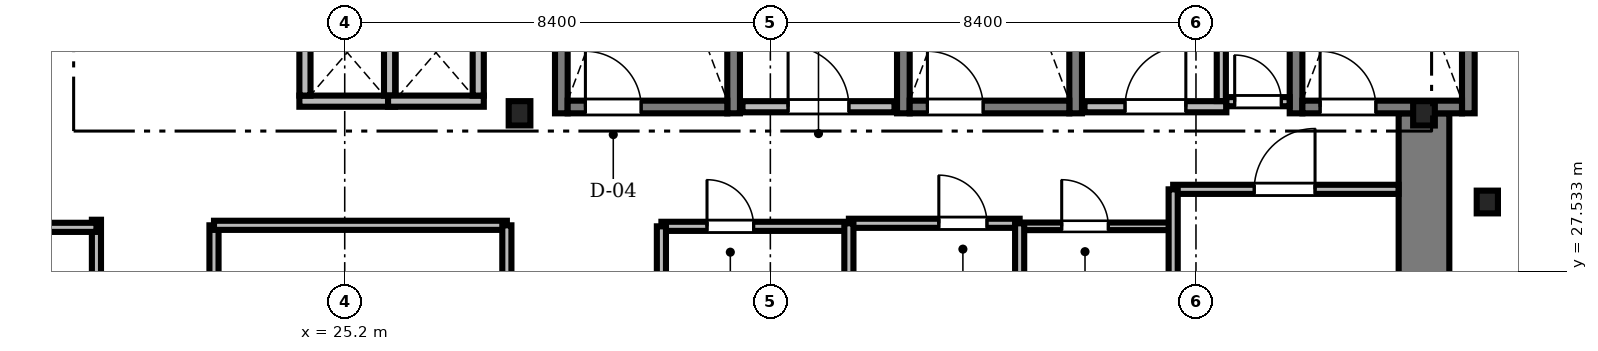
"""IFC4 building model, lengths in metres.
Left out: names, types, materials, properties, quantities, classifications, styles, units other than length and angle.
Written with IfcOpenShell. Run it as: python <this file> out.ifc"""

import sys

from ifc_helpers import new_model, si_unit, direction, frame, frame_2d, origin, origin_2d, place, context, subcontext, project, spatial, rectangle, i_section, extrude, source, transform, mapped, element, fill, save


model = new_model("IFC4")
c1 = context("Model", 3, precision=1e-05, world=origin(), true_north=direction((0.0, 1.0)))
c2 = subcontext(c1, "Body", "Model", "MODEL_VIEW")
j1 = project(units=[si_unit("LENGTHUNIT", "METRE"), si_unit("PLANEANGLEUNIT", "RADIAN")], contexts=[c1])
p1 = place(None, origin())
s1 = spatial("IfcSite", under=j1, at=p1, CompositionType="ELEMENT")
p2 = place(p1, origin())
s2 = spatial("IfcBuilding", under=s1, at=p2, CompositionType="ELEMENT")
p3 = place(p2, frame((0.0, 0.0, 67.75)))
s3 = spatial("IfcBuildingStorey", under=s2, at=p3, CompositionType="ELEMENT", Elevation=67.75)
m1 = source(origin(), c2, "Body", "SweptSolid", [
    extrude(rectangle(XDim=13.15, YDim=1.0, at=frame_2d((6.575, 0.0))), origin(), (0.0, 0.0, 1.0), 3.41),
])
p4 = place(p3, frame((46.5, 17.5, 0.0), z_axis=(0.0, 0.0, 1.0), x_axis=(0.0, 1.0, 0.0)))
e1 = element("IfcWall", 1, at=p4, inside=s3, PredefinedType="SHEAR", context=c2, shape_type="MappedRepresentation", body=[
    mapped(m1, transform((0.0, 0.0, 0.0), scale=1.0)),
])
m2 = source(origin(), c2, "Body", "SweptSolid", [
    extrude(i_section(OverallWidth=0.428, OverallDepth=0.481, WebThickness=0.04, FlangeThickness=0.063, FilletRadius=0.015, at=origin_2d()), origin(), (0.0, 0.0, 1.0), 3.41),
])
for number, where, z_axis, x_axis in (
    (2, (28.65, 30.65, 0.0), (0.0, 0.0, 1.0), (1.0, 0.0, 0.0)),
    (3, (46.5, 30.65, 0.0), (0.0, 0.0, 1.0), (1.0, 0.0, 0.0)),
):
    element("IfcColumn", number, at=place(p3, frame(where, z_axis=z_axis, x_axis=x_axis)), inside=s3, PredefinedType="COLUMN", context=c2, shape_type="MappedRepresentation", body=[
        mapped(m2, transform((0.0, 0.0, 0.0), scale=1.0)),
    ])
m3 = source(origin(), c2, "Body", "SweptSolid", [
    extrude(i_section(OverallWidth=0.419, OverallDepth=0.449, WebThickness=0.031, FlangeThickness=0.048, FilletRadius=0.015, at=origin_2d()), origin(), (0.0, 0.0, 1.0), 3.41),
])
p5 = place(p3, frame((47.75, 28.9, 0.0), z_axis=(0.0, 0.0, 1.0), x_axis=(1.0, 0.0, 0.0)))
e4 = element("IfcColumn", 4, at=p5, inside=s3, PredefinedType="COLUMN", context=c2, shape_type="MappedRepresentation", body=[
    mapped(m3, transform((0.0, 0.0, 0.0), scale=1.0)),
])
m4 = source(origin(), c2, "Body", "SweptSolid", [
    extrude(rectangle(XDim=9.15, YDim=0.25, at=frame_2d((4.575, 0.0))), origin(), (0.0, 0.0, 1.0), 3.45),
])
for number, where, z_axis, x_axis in (
    (5, (29.475, 30.65, 0.0), (0.0, 0.0, 1.0), (0.0, 1.0, 0.0)),
    (6, (32.875, 30.65, 0.0), (0.0, 0.0, 1.0), (0.0, 1.0, 0.0)),
):
    element("IfcWall", number, at=place(p3, frame(where, z_axis=z_axis, x_axis=x_axis)), inside=s3, PredefinedType="SOLIDWALL", context=c2, shape_type="MappedRepresentation", body=[
        mapped(m4, transform((0.0, 0.0, 0.0), scale=1.0)),
    ])
m5 = source(origin(), c2, "Body", "SweptSolid", [
    extrude(rectangle(XDim=3.15, YDim=0.25, at=frame_2d((1.575, 0.0))), origin(), (0.0, 0.0, 1.0), 3.45),
])
p6 = place(p3, frame((29.6, 30.775, 0.0), z_axis=(0.0, 0.0, 1.0), x_axis=(1.0, 0.0, 0.0)))
e7 = element("IfcWall", 7, at=p6, inside=s3, PredefinedType="SOLIDWALL", context=c2, shape_type="MappedRepresentation", body=[
    mapped(m5, transform((0.0, 0.0, 0.0), scale=1.0)),
])
m6 = source(origin(), c2, "Body", "SweptSolid", [
    extrude(rectangle(XDim=1.1, YDim=2.2, at=frame_2d((0.55, 1.1))), frame((0.0, 0.135, 0.0), z_axis=(0.0, -1.0, 0.0), x_axis=(1.0, 0.0, 0.0)), (0.0, 0.0, 1.0), 0.27),
])
p7 = place(p6, frame((0.35, 0.0, 0.0)))
e8 = element("IfcOpeningElement", 8, at=p7, cuts=e7, PredefinedType="OPENING", context=c2, shape_type="MappedRepresentation", body=[
    mapped(m6, transform((0.0, 0.0, 0.0), scale=1.0)),
])
for number, where, z_axis, x_axis in (
    (9, (36.225, 30.65, 0.0), (0.0, 0.0, 1.0), (0.0, 1.0, 0.0)),
    (10, (39.625, 30.65, 0.0), (0.0, 0.0, 1.0), (0.0, 1.0, 0.0)),
):
    element("IfcWall", number, at=place(p3, frame(where, z_axis=z_axis, x_axis=x_axis)), inside=s3, PredefinedType="SOLIDWALL", context=c2, shape_type="MappedRepresentation", body=[
        mapped(m4, transform((0.0, 0.0, 0.0), scale=1.0)),
    ])
p8 = place(p3, frame((36.35, 30.775, 0.0), z_axis=(0.0, 0.0, 1.0), x_axis=(1.0, 0.0, 0.0)))
e11 = element("IfcWall", 11, at=p8, inside=s3, PredefinedType="SOLIDWALL", context=c2, shape_type="MappedRepresentation", body=[
    mapped(m5, transform((0.0, 0.0, 0.0), scale=1.0)),
])
p9 = place(p8, frame((0.35, 0.0, 0.0)))
e12 = element("IfcOpeningElement", 12, at=p9, cuts=e11, PredefinedType="OPENING", context=c2, shape_type="MappedRepresentation", body=[
    mapped(m6, transform((0.0, 0.0, 0.0), scale=1.0)),
])
for number, where, z_axis, x_axis in (
    (13, (43.975, 30.65, 0.0), (0.0, 0.0, 1.0), (0.0, 1.0, 0.0)),
    (14, (47.375, 30.65, 0.0), (0.0, 0.0, 1.0), (0.0, 1.0, 0.0)),
):
    element("IfcWall", number, at=place(p3, frame(where, z_axis=z_axis, x_axis=x_axis)), inside=s3, PredefinedType="SOLIDWALL", context=c2, shape_type="MappedRepresentation", body=[
        mapped(m4, transform((0.0, 0.0, 0.0), scale=1.0)),
    ])
p10 = place(p3, frame((44.1, 30.775, 0.0), z_axis=(0.0, 0.0, 1.0), x_axis=(1.0, 0.0, 0.0)))
e15 = element("IfcWall", 15, at=p10, inside=s3, PredefinedType="SOLIDWALL", context=c2, shape_type="MappedRepresentation", body=[
    mapped(m5, transform((0.0, 0.0, 0.0), scale=1.0)),
])
p11 = place(p10, frame((0.35, 0.0, 0.0)))
e16 = element("IfcOpeningElement", 16, at=p11, cuts=e15, PredefinedType="OPENING", context=c2, shape_type="MappedRepresentation", body=[
    mapped(m6, transform((0.0, 0.0, 0.0), scale=1.0)),
])
m7 = source(origin(), c2, "Body", "SweptSolid", [
    extrude(rectangle(XDim=3.0, YDim=0.22, at=frame_2d((1.5, 0.0))), origin(), (0.0, 0.0, 1.0), 3.41),
])
p12 = place(p3, frame((33.05, 30.78, 0.0), z_axis=(0.0, 0.0, 1.0), x_axis=(1.0, 0.0, 0.0)))
e17 = element("IfcWall", 17, at=p12, inside=s3, PredefinedType="SOLIDWALL", context=c2, shape_type="MappedRepresentation", body=[
    mapped(m7, transform((0.0, 0.0, 0.0), scale=1.0)),
])
m8 = source(origin(), c2, "Body", "SweptSolid", [
    extrude(rectangle(XDim=1.2, YDim=2.2, at=frame_2d((0.6, 1.1))), frame((0.0, 0.12, 0.0), z_axis=(0.0, -1.0, 0.0), x_axis=(1.0, 0.0, 0.0)), (0.0, 0.0, 1.0), 0.24),
])
p13 = place(p12, frame((0.9, 0.0, 0.0)))
e18 = element("IfcOpeningElement", 18, at=p13, cuts=e17, PredefinedType="OPENING", context=c2, shape_type="MappedRepresentation", body=[
    mapped(m8, transform((0.0, 0.0, 0.0), scale=1.0)),
])
m9 = source(origin(), c2, "Body", "SweptSolid", [
    extrude(rectangle(XDim=2.8, YDim=0.22, at=frame_2d((1.4, 0.0))), origin(), (0.0, 0.0, 1.0), 3.41),
])
p14 = place(p3, frame((39.8, 30.78, 0.0), z_axis=(0.0, 0.0, 1.0), x_axis=(1.0, 0.0, 0.0)))
e19 = element("IfcWall", 19, at=p14, inside=s3, PredefinedType="SOLIDWALL", context=c2, shape_type="MappedRepresentation", body=[
    mapped(m9, transform((0.0, 0.0, 0.0), scale=1.0)),
])
p15 = place(p14, frame((0.8, 0.0, 0.0)))
e20 = element("IfcOpeningElement", 20, at=p15, cuts=e19, PredefinedType="OPENING", context=c2, shape_type="MappedRepresentation", body=[
    mapped(m8, transform((0.0, 0.0, 0.0), scale=1.0)),
])
m10 = source(origin(), c2, "Body", "SweptSolid", [
    extrude(rectangle(XDim=1.89, YDim=0.22, at=frame_2d((0.945, 0.0))), origin(), (0.0, 0.0, 1.0), 3.41),
])
p16 = place(p3, frame((24.305, 30.89, 0.0), z_axis=(0.0, 0.0, 1.0), x_axis=(1.0, 0.0, 0.0)))
e21 = element("IfcWall", 21, at=p16, inside=s3, PredefinedType="SOLIDWALL", context=c2, shape_type="MappedRepresentation", body=[
    mapped(m10, transform((0.0, 0.0, 0.0), scale=1.0)),
])
m11 = source(origin(), c2, "Body", "SweptSolid", [
    extrude(rectangle(XDim=1.7, YDim=0.22, at=frame_2d((0.85, 0.0))), origin(), (0.0, 0.0, 1.0), 3.41),
])
for number, where, z_axis, x_axis in (
    (22, (24.415, 31.0, 0.0), (0.0, 0.0, 1.0), (0.0, 1.0, 0.0)),
    (23, (26.085, 31.0, 0.0), (0.0, 0.0, 1.0), (0.0, 1.0, 0.0)),
):
    element("IfcWall", number, at=place(p3, frame(where, z_axis=z_axis, x_axis=x_axis)), inside=s3, PredefinedType="SOLIDWALL", context=c2, shape_type="MappedRepresentation", body=[
        mapped(m11, transform((0.0, 0.0, 0.0), scale=1.0)),
    ])
p17 = place(p3, frame((26.055, 30.89, 0.0), z_axis=(0.0, 0.0, 1.0), x_axis=(1.0, 0.0, 0.0)))
e24 = element("IfcWall", 24, at=p17, inside=s3, PredefinedType="SOLIDWALL", context=c2, shape_type="MappedRepresentation", body=[
    mapped(m10, transform((0.0, 0.0, 0.0), scale=1.0)),
])
p18 = place(p3, frame((27.835, 31.0, 0.0), z_axis=(0.0, 0.0, 1.0), x_axis=(0.0, 1.0, 0.0)))
e25 = element("IfcWall", 25, at=p18, inside=s3, PredefinedType="SOLIDWALL", context=c2, shape_type="MappedRepresentation", body=[
    mapped(m11, transform((0.0, 0.0, 0.0), scale=1.0)),
])
m12 = source(origin(), c2, "Body", "SweptSolid", [
    extrude(rectangle(XDim=13.84, YDim=0.18, at=frame_2d((6.92, 0.0))), origin(), (0.0, 0.0, 1.0), 2.802),
])
p19 = place(p3, frame((20.3, 14.71, 0.0), z_axis=(0.0, 0.0, 1.0), x_axis=(0.0, 1.0, 0.0)))
e26 = element("IfcWall", 26, at=p19, inside=s3, PredefinedType="PARTITIONING", context=c2, shape_type="MappedRepresentation", body=[
    mapped(m12, transform((0.0, 0.0, 0.0), scale=1.0)),
])
m13 = source(origin(), c2, "Body", "SweptSolid", [
    extrude(rectangle(XDim=1.05, YDim=2.2, at=frame_2d((0.525, 1.1))), frame((0.0, 0.1, 0.0), z_axis=(0.0, -1.0, 0.0), x_axis=(1.0, 0.0, 0.0)), (0.0, 0.0, 1.0), 0.2),
])
p20 = place(p19, frame((2.903, 0.0, 0.0)))
e27 = element("IfcOpeningElement", 27, at=p20, cuts=e26, PredefinedType="OPENING", context=c2, shape_type="MappedRepresentation", body=[
    mapped(m13, transform((0.0, 0.0, 0.0), scale=1.0)),
])
p21 = place(p19, frame((9.748, 0.0, 0.0)))
e28 = element("IfcOpeningElement", 28, at=p21, cuts=e26, PredefinedType="OPENING", context=c2, shape_type="MappedRepresentation", body=[
    mapped(m13, transform((0.0, 0.0, 0.0), scale=1.0)),
])
m14 = source(origin(), c2, "Body", "SweptSolid", [
    extrude(rectangle(XDim=4.448, YDim=0.18, at=frame_2d((2.224, 0.0))), origin(), (0.0, 0.0, 1.0), 3.042),
])
p22 = place(p3, frame((41.55, 29.15, 0.0), z_axis=(0.0, 0.0, 1.0), x_axis=(1.0, 0.0, 0.0)))
e29 = element("IfcWall", 29, at=p22, inside=s3, PredefinedType="PARTITIONING", context=c2, shape_type="MappedRepresentation", body=[
    mapped(m14, transform((0.0, 0.0, 0.0), scale=1.0)),
])
m15 = source(origin(), c2, "Body", "SweptSolid", [
    extrude(rectangle(XDim=1.2, YDim=2.2, at=frame_2d((0.6, 1.1))), frame((0.0, 0.1, 0.0), z_axis=(0.0, -1.0, 0.0), x_axis=(1.0, 0.0, 0.0)), (0.0, 0.0, 1.0), 0.2),
])
p23 = place(p22, frame((1.6, 0.0, 0.0)))
e30 = element("IfcOpeningElement", 30, at=p23, cuts=e29, PredefinedType="OPENING", context=c2, shape_type="MappedRepresentation", body=[
    mapped(m15, transform((0.0, 0.0, 0.0), scale=1.0)),
])
m16 = source(origin(), c2, "Body", "SweptSolid", [
    extrude(rectangle(XDim=4.24, YDim=0.18, at=frame_2d((2.12, 0.0))), origin(), (0.0, 0.0, 1.0), 2.802),
])
p24 = place(p3, frame((22.62, 24.2, 0.0), z_axis=(0.0, 0.0, 1.0), x_axis=(0.0, 1.0, 0.0)))
e31 = element("IfcWall", 31, at=p24, inside=s3, PredefinedType="PARTITIONING", context=c2, shape_type="MappedRepresentation", body=[
    mapped(m16, transform((0.0, 0.0, 0.0), scale=1.0)),
])
p25 = place(p24, frame((1.4, 0.0, 0.0)))
e32 = element("IfcOpeningElement", 32, at=p25, cuts=e31, PredefinedType="OPENING", context=c2, shape_type="MappedRepresentation", body=[
    mapped(m13, transform((0.0, 0.0, 0.0), scale=1.0)),
])
m17 = source(origin(), c2, "Body", "SweptSolid", [
    extrude(rectangle(XDim=3.7, YDim=0.18, at=frame_2d((1.85, 0.0))), origin(), (0.0, 0.0, 1.0), 3.042),
])
p26 = place(p3, frame((31.45, 28.42, 0.0), z_axis=(0.0, 0.0, 1.0), x_axis=(1.0, 0.0, 0.0)))
e33 = element("IfcWall", 33, at=p26, inside=s3, PredefinedType="PARTITIONING", context=c2, shape_type="MappedRepresentation", body=[
    mapped(m17, transform((0.0, 0.0, 0.0), scale=1.0)),
])
m18 = source(origin(), c2, "Body", "SweptSolid", [
    extrude(rectangle(XDim=0.92, YDim=2.1, at=frame_2d((0.46, 1.05))), frame((0.0, 0.1, 0.0), z_axis=(0.0, -1.0, 0.0), x_axis=(1.0, 0.0, 0.0)), (0.0, 0.0, 1.0), 0.2),
])
p27 = place(p26, frame((0.9, 0.0, 0.0)))
e34 = element("IfcOpeningElement", 34, at=p27, cuts=e33, PredefinedType="OPENING", context=c2, shape_type="MappedRepresentation", body=[
    mapped(m18, transform((0.0, 0.0, 0.0), scale=1.0)),
])
m19 = source(origin(), c2, "Body", "SweptSolid", [
    extrude(rectangle(XDim=3.37, YDim=0.18, at=frame_2d((1.685, 0.0))), origin(), (0.0, 0.0, 1.0), 3.41),
])
p28 = place(p3, frame((35.15, 28.48, 0.0), z_axis=(0.0, 0.0, 1.0), x_axis=(1.0, 0.0, 0.0)))
e35 = element("IfcWall", 35, at=p28, inside=s3, PredefinedType="PARTITIONING", context=c2, shape_type="MappedRepresentation", body=[
    mapped(m19, transform((0.0, 0.0, 0.0), scale=1.0)),
])
m20 = source(origin(), c2, "Body", "SweptSolid", [
    extrude(rectangle(XDim=0.95, YDim=2.15, at=frame_2d((0.475, 1.075))), frame((0.0, 0.1, 0.0), z_axis=(0.0, -1.0, 0.0), x_axis=(1.0, 0.0, 0.0)), (0.0, 0.0, 1.0), 0.2),
])
p29 = place(p28, frame((1.775, 0.0, 0.0)))
e36 = element("IfcOpeningElement", 36, at=p29, cuts=e35, PredefinedType="OPENING", context=c2, shape_type="MappedRepresentation", body=[
    mapped(m20, transform((0.0, 0.0, 0.0), scale=1.0)),
])
m21 = source(origin(), c2, "Body", "SweptSolid", [
    extrude(rectangle(XDim=3.0, YDim=0.15, at=frame_2d((1.5, 0.0))), origin(), (0.0, 0.0, 1.0), 3.41),
])
p30 = place(p3, frame((38.52, 28.42, 0.0), z_axis=(0.0, 0.0, 1.0), x_axis=(1.0, 0.0, 0.0)))
e37 = element("IfcWall", 37, at=p30, inside=s3, PredefinedType="PARTITIONING", context=c2, shape_type="MappedRepresentation", body=[
    mapped(m21, transform((0.0, 0.0, 0.0), scale=1.0)),
])
m22 = source(origin(), c2, "Body", "SweptSolid", [
    extrude(rectangle(XDim=0.92, YDim=2.1, at=frame_2d((0.46, 1.05))), frame((0.0, 0.085, 0.0), z_axis=(0.0, -1.0, 0.0), x_axis=(1.0, 0.0, 0.0)), (0.0, 0.0, 1.0), 0.17),
])
p31 = place(p30, frame((0.83, 0.0, 0.0)))
e38 = element("IfcOpeningElement", 38, at=p31, cuts=e37, PredefinedType="OPENING", context=c2, shape_type="MappedRepresentation", body=[
    mapped(m22, transform((0.0, 0.0, 0.0), scale=1.0)),
])
m23 = source(origin(), c2, "Body", "SweptSolid", [
    extrude(rectangle(XDim=1.248, YDim=0.18, at=frame_2d((0.624, 0.0))), origin(), (0.0, 0.0, 1.0), 3.41),
])
p32 = place(p3, frame((42.6, 30.88, 0.0), z_axis=(0.0, 0.0, 1.0), x_axis=(1.0, 0.0, 0.0)))
e39 = element("IfcWall", 39, at=p32, inside=s3, PredefinedType="PARTITIONING", context=c2, shape_type="MappedRepresentation", body=[
    mapped(m23, transform((0.0, 0.0, 0.0), scale=1.0)),
])
p33 = place(p32, frame((0.164, 0.0, 0.0)))
e40 = element("IfcOpeningElement", 40, at=p33, cuts=e39, PredefinedType="OPENING", context=c2, shape_type="MappedRepresentation", body=[
    mapped(m18, transform((0.0, 0.0, 0.0), scale=1.0)),
])
m24 = source(origin(), c2, "Body", "SweptSolid", [
    extrude(rectangle(XDim=18.07, YDim=0.18, at=frame_2d((9.035, 0.0))), origin(), (0.0, 0.0, 1.0), 2.652),
])
p34 = place(p3, frame((2.23, 28.4, 0.0), z_axis=(0.0, 0.0, 1.0), x_axis=(1.0, 0.0, 0.0)))
e41 = element("IfcWall", 41, at=p34, inside=s3, PredefinedType="PARTITIONING", context=c2, shape_type="MappedRepresentation", body=[
    mapped(m24, transform((0.0, 0.0, 0.0), scale=1.0)),
])
m25 = source(origin(), c2, "Body", "SweptSolid", [
    extrude(rectangle(XDim=5.78, YDim=0.18, at=frame_2d((2.89, 0.0))), origin(), (0.0, 0.0, 1.0), 3.41),
])
p35 = place(p3, frame((22.62, 28.44, 0.0), z_axis=(0.0, 0.0, 1.0), x_axis=(1.0, 0.0, 0.0)))
e42 = element("IfcWall", 42, at=p35, inside=s3, PredefinedType="PARTITIONING", context=c2, shape_type="MappedRepresentation", body=[
    mapped(m25, transform((0.0, 0.0, 0.0), scale=1.0)),
])
p36 = place(p3, frame((28.4, 24.2, 0.0), z_axis=(0.0, 0.0, 1.0), x_axis=(0.0, 1.0, 0.0)))
e43 = element("IfcWall", 43, at=p36, inside=s3, PredefinedType="PARTITIONING", context=c2, shape_type="MappedRepresentation", body=[
    mapped(m16, transform((0.0, 0.0, 0.0), scale=1.0)),
])
m26 = source(origin(), c2, "Body", "SweptSolid", [
    extrude(rectangle(XDim=2.35, YDim=0.18, at=frame_2d((1.175, 0.0))), origin(), (0.0, 0.0, 1.0), 2.802),
])
p37 = place(p3, frame((41.55, 26.8, 0.0), z_axis=(0.0, 0.0, 1.0), x_axis=(0.0, 1.0, 0.0)))
e44 = element("IfcWall", 44, at=p37, inside=s3, PredefinedType="PARTITIONING", context=c2, shape_type="MappedRepresentation", body=[
    mapped(m26, transform((0.0, 0.0, 0.0), scale=1.0)),
])
m27 = source(origin(), c2, "Body", "SweptSolid", [
    extrude(rectangle(XDim=1.858, YDim=0.18, at=frame_2d((0.929, 0.0))), origin(), (0.0, 0.0, 1.0), 3.41),
])
p38 = place(p3, frame((42.5, 30.892, 0.0), z_axis=(0.0, 0.0, 1.0), x_axis=(0.0, 1.0, 0.0)))
e45 = element("IfcWall", 45, at=p38, inside=s3, PredefinedType="PARTITIONING", context=c2, shape_type="MappedRepresentation", body=[
    mapped(m27, transform((0.0, 0.0, 0.0), scale=1.0)),
])
m28 = source(origin(), c2, "Body", "SweptSolid", [
    extrude(rectangle(XDim=1.66, YDim=0.18, at=frame_2d((0.83, 0.0))), origin(), (0.0, 0.0, 1.0), 2.952),
])
for number, where, z_axis, x_axis in (
    (46, (35.15, 26.82, 0.0), (0.0, 0.0, 1.0), (0.0, 1.0, 0.0)),
    (47, (38.52, 26.82, 0.0), (0.0, 0.0, 1.0), (0.0, 1.0, 0.0)),
):
    element("IfcWall", number, at=place(p3, frame(where, z_axis=z_axis, x_axis=x_axis)), inside=s3, PredefinedType="PARTITIONING", context=c2, shape_type="MappedRepresentation", body=[
        mapped(m28, transform((0.0, 0.0, 0.0), scale=1.0)),
    ])
m29 = source(origin(), c2, "Body", "SweptSolid", [
    extrude(rectangle(XDim=1.6, YDim=0.18, at=frame_2d((0.8, 0.0))), origin(), (0.0, 0.0, 1.0), 2.952),
])
p39 = place(p3, frame((31.45, 26.82, 0.0), z_axis=(0.0, 0.0, 1.0), x_axis=(0.0, 1.0, 0.0)))
e48 = element("IfcWall", 48, at=p39, inside=s3, PredefinedType="PARTITIONING", context=c2, shape_type="MappedRepresentation", body=[
    mapped(m29, transform((0.0, 0.0, 0.0), scale=1.0)),
])
m30 = source(origin(), c2, "Body", "SweptSolid", [
    extrude(rectangle(XDim=1.1, YDim=2.2, at=frame_2d((0.55, 1.1))), frame((0.0, 0.025, 0.0), z_axis=(0.0, -1.0, 0.0), x_axis=(1.0, 0.0, 0.0)), (0.0, 0.0, 1.0), 0.05),
])
p40 = place(p7, origin())
e49 = element("IfcDoor", 49, at=p40, inside=s3, OperationType="SINGLE_SWING_LEFT", PredefinedType="DOOR", context=c2, shape_type="MappedRepresentation", body=[
    mapped(m30, transform((0.0, 0.0, 0.0), scale=1.0)),
])
fill(e8, e49)
p41 = place(p9, origin())
e50 = element("IfcDoor", 50, at=p41, inside=s3, OperationType="SINGLE_SWING_LEFT", PredefinedType="DOOR", context=c2, shape_type="MappedRepresentation", body=[
    mapped(m30, transform((0.0, 0.0, 0.0), scale=1.0)),
])
fill(e12, e50)
p42 = place(p11, origin())
e51 = element("IfcDoor", 51, at=p42, inside=s3, OperationType="SINGLE_SWING_LEFT", PredefinedType="DOOR", context=c2, shape_type="MappedRepresentation", body=[
    mapped(m30, transform((0.0, 0.0, 0.0), scale=1.0)),
])
fill(e16, e51)
m31 = source(origin(), c2, "Body", "SweptSolid", [
    extrude(rectangle(XDim=1.2, YDim=2.2, at=frame_2d((0.6, 1.1))), frame((0.0, 0.025, 0.0), z_axis=(0.0, -1.0, 0.0), x_axis=(1.0, 0.0, 0.0)), (0.0, 0.0, 1.0), 0.05),
])
p43 = place(p13, origin())
e52 = element("IfcDoor", 52, at=p43, inside=s3, OperationType="SINGLE_SWING_LEFT", PredefinedType="DOOR", context=c2, shape_type="MappedRepresentation", body=[
    mapped(m31, transform((0.0, 0.0, 0.0), scale=1.0)),
])
fill(e18, e52)
p44 = place(p15, origin())
e53 = element("IfcDoor", 53, at=p44, inside=s3, OperationType="SINGLE_SWING_RIGHT", PredefinedType="DOOR", context=c2, shape_type="MappedRepresentation", body=[
    mapped(m31, transform((0.0, 0.0, 0.0), scale=1.0)),
])
fill(e20, e53)
p45 = place(p23, origin())
e54 = element("IfcDoor", 54, at=p45, inside=s3, OperationType="SINGLE_SWING_RIGHT", PredefinedType="DOOR", context=c2, shape_type="MappedRepresentation", body=[
    mapped(m31, transform((0.0, 0.0, 0.0), scale=1.0)),
])
fill(e30, e54)
m32 = source(origin(), c2, "Body", "SweptSolid", [
    extrude(rectangle(XDim=0.92, YDim=2.1, at=frame_2d((0.46, 1.05))), frame((0.0, 0.025, 0.0), z_axis=(0.0, -1.0, 0.0), x_axis=(1.0, 0.0, 0.0)), (0.0, 0.0, 1.0), 0.05),
])
p46 = place(p27, origin())
e55 = element("IfcDoor", 55, at=p46, inside=s3, OperationType="SINGLE_SWING_LEFT", PredefinedType="DOOR", context=c2, shape_type="MappedRepresentation", body=[
    mapped(m32, transform((0.0, 0.0, 0.0), scale=1.0)),
])
fill(e34, e55)
m33 = source(origin(), c2, "Body", "SweptSolid", [
    extrude(rectangle(XDim=0.95, YDim=2.15, at=frame_2d((0.475, 1.075))), frame((0.0, 0.025, 0.0), z_axis=(0.0, -1.0, 0.0), x_axis=(1.0, 0.0, 0.0)), (0.0, 0.0, 1.0), 0.05),
])
p47 = place(p29, origin())
e56 = element("IfcDoor", 56, at=p47, inside=s3, OperationType="SINGLE_SWING_LEFT", PredefinedType="DOOR", context=c2, shape_type="MappedRepresentation", body=[
    mapped(m33, transform((0.0, 0.0, 0.0), scale=1.0)),
])
fill(e36, e56)
p48 = place(p31, origin())
e57 = element("IfcDoor", 57, at=p48, inside=s3, OperationType="SINGLE_SWING_LEFT", PredefinedType="DOOR", context=c2, shape_type="MappedRepresentation", body=[
    mapped(m32, transform((0.0, 0.0, 0.0), scale=1.0)),
])
fill(e38, e57)
p49 = place(p33, origin())
e58 = element("IfcDoor", 58, at=p49, inside=s3, OperationType="SINGLE_SWING_LEFT", PredefinedType="DOOR", context=c2, shape_type="MappedRepresentation", body=[
    mapped(m32, transform((0.0, 0.0, 0.0), scale=1.0)),
])
fill(e40, e58)
save(model, sys.argv[1])
